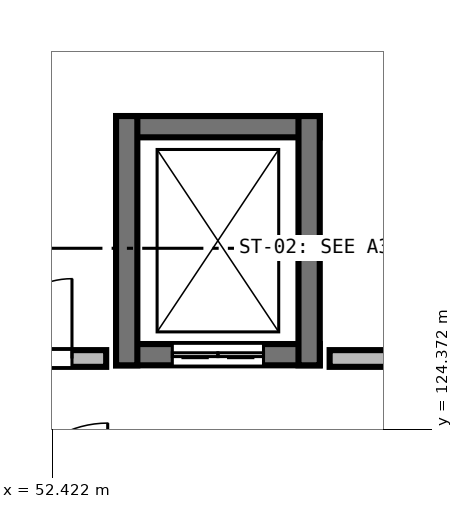
"""IFC4 building model, lengths in metres.
Left out: names, types, materials, properties, quantities, classifications, styles, units other than length and angle.
Written with IfcOpenShell. Run it as: python <this file> out.ifc"""

import sys

from ifc_helpers import new_model, si_unit, direction, frame, frame_2d, origin, place, context, subcontext, project, spatial, rectangle, extrude, element, fill, save


model = new_model("IFC4")
c1 = context("Model", 3, precision=1e-05, world=origin(), true_north=direction((0.0, 1.0)))
c2 = subcontext(c1, "Body", "Model", "MODEL_VIEW")
j1 = project(units=[si_unit("LENGTHUNIT", "METRE"), si_unit("PLANEANGLEUNIT", "RADIAN")], contexts=[c1])
p1 = place(None, origin())
s1 = spatial("IfcSite", under=j1, at=p1, CompositionType="ELEMENT")
p2 = place(p1, origin())
s2 = spatial("IfcBuilding", under=s1, at=p2, CompositionType="ELEMENT")
p3 = place(p2, frame((0.0, 0.0, -4.8)))
s3 = spatial("IfcBuildingStorey", under=s2, at=p3, CompositionType="ELEMENT", Elevation=-4.8)
p4 = place(p3, frame((55.94, 125.35, 0.0), z_axis=(0.0, 0.0, 1.0), x_axis=(-1.0, 0.0, 0.0)))
e1 = element("IfcWall", 1, at=p4, inside=s3, PredefinedType="SHEAR", context=c2, shape_type="SweptSolid", body=[
    extrude(rectangle(XDim=2.68, YDim=0.28, at=frame_2d((1.34, 0.0))), origin(), (0.0, 0.0, 1.0), 4.5),
])
p5 = place(p4, frame((0.74, 0.0, 0.0)))
e2 = element("IfcOpeningElement", 2, at=p5, cuts=e1, PredefinedType="OPENING", context=c2, shape_type="SweptSolid", body=[
    extrude(rectangle(XDim=1.2, YDim=2.15, at=frame_2d((0.6, 1.075))), frame((0.0, 0.15, 0.0), z_axis=(0.0, -1.0, 0.0), x_axis=(1.0, 0.0, 0.0)), (0.0, 0.0, 1.0), 0.3),
])
p6 = place(p3, frame((53.26, 128.35, 0.0), z_axis=(0.0, 0.0, 1.0), x_axis=(1.0, 0.0, 0.0)))
e3 = element("IfcWall", 3, at=p6, inside=s3, PredefinedType="SHEAR", context=c2, shape_type="SweptSolid", body=[
    extrude(rectangle(XDim=2.68, YDim=0.28, at=frame_2d((1.34, 0.0))), origin(), (0.0, 0.0, 1.0), 4.5),
])
for number, where, z_axis, x_axis in (
    (4, (53.4, 125.21, 0.0), (0.0, 0.0, 1.0), (0.0, 1.0, 0.0)),
    (5, (55.8, 128.49, 0.0), (0.0, 0.0, 1.0), (0.0, -1.0, 0.0)),
):
    element("IfcWall", number, at=place(p3, frame(where, z_axis=z_axis, x_axis=x_axis)), inside=s3, PredefinedType="SHEAR", context=c2, shape_type="SweptSolid", body=[
        extrude(rectangle(XDim=3.28, YDim=0.28, at=frame_2d((1.64, 0.0))), origin(), (0.0, 0.0, 1.0), 4.5),
    ])
p7 = place(p3, frame((50.4, 125.3, 0.0), z_axis=(0.0, 0.0, 1.0), x_axis=(1.0, 0.0, 0.0)))
e6 = element("IfcWall", 6, at=p7, inside=s3, PredefinedType="SOLIDWALL", context=c2, shape_type="SweptSolid", body=[
    extrude(rectangle(XDim=2.73, YDim=0.22, at=frame_2d((1.365, 0.0))), origin(), (0.0, 0.0, 1.0), 3.785),
])
p8 = place(p7, frame((1.23, 0.0, 0.0)))
e7 = element("IfcOpeningElement", 7, at=p8, cuts=e6, PredefinedType="OPENING", context=c2, shape_type="SweptSolid", body=[
    extrude(rectangle(XDim=1.05, YDim=2.15, at=frame_2d((0.525, 1.075))), frame((0.0, 0.12, 0.0), z_axis=(0.0, -1.0, 0.0), x_axis=(1.0, 0.0, 0.0)), (0.0, 0.0, 1.0), 0.24),
])
p9 = place(p3, frame((56.07, 125.3, 0.0), z_axis=(0.0, 0.0, 1.0), x_axis=(1.0, 0.0, 0.0)))
e8 = element("IfcWall", 8, at=p9, inside=s3, PredefinedType="SOLIDWALL", context=c2, shape_type="SweptSolid", body=[
    extrude(rectangle(XDim=27.93, YDim=0.22, at=frame_2d((13.965, 0.0))), origin(), (0.0, 0.0, 1.0), 3.785),
])
p10 = place(p5, origin())
e9 = element("IfcDoor", 9, at=p10, inside=s3, OperationType="DOUBLE_DOOR_SLIDING", PredefinedType="DOOR", context=c2, shape_type="SweptSolid", body=[
    extrude(rectangle(XDim=1.2, YDim=2.15, at=frame_2d((0.6, 1.075))), frame((0.0, 0.025, 0.0), z_axis=(0.0, -1.0, 0.0), x_axis=(1.0, 0.0, 0.0)), (0.0, 0.0, 1.0), 0.05),
])
fill(e2, e9)
p11 = place(p8, origin())
e10 = element("IfcDoor", 10, at=p11, inside=s3, OperationType="SINGLE_SWING_RIGHT", PredefinedType="DOOR", context=c2, shape_type="SweptSolid", body=[
    extrude(rectangle(XDim=1.05, YDim=2.15, at=frame_2d((0.525, 1.075))), frame((0.0, 0.025, 0.0), z_axis=(0.0, -1.0, 0.0), x_axis=(1.0, 0.0, 0.0)), (0.0, 0.0, 1.0), 0.05),
])
fill(e7, e10)
save(model, sys.argv[1])
